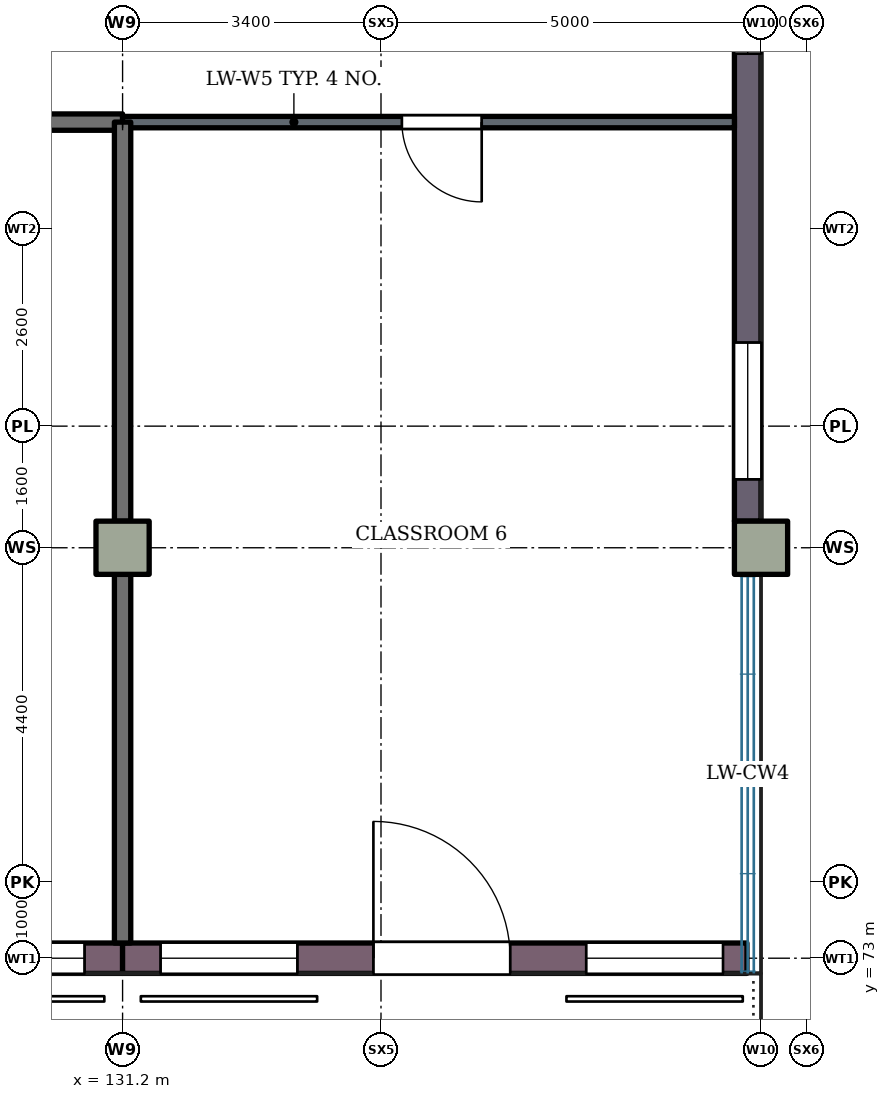
"""IFC4 building model, lengths in metres.
Left out: names, types, materials, properties, quantities, classifications, styles, units other than length and angle.
Written with IfcOpenShell. Run it as: python <this file> out.ifc"""

import sys

from ifc_helpers import new_model, si_unit, direction, frame, frame_2d, origin, origin_2d, place, context, subcontext, project, spatial, rectangle, extrude, element, fill, save


model = new_model("IFC4")
c1 = context("Model", 3, precision=1e-05, world=origin(), true_north=direction((0.0, 1.0)))
c2 = subcontext(c1, "Body", "Model", "MODEL_VIEW")
j1 = project(units=[si_unit("LENGTHUNIT", "METRE"), si_unit("PLANEANGLEUNIT", "RADIAN")], contexts=[c1])
p1 = place(None, origin())
s1 = spatial("IfcSite", under=j1, at=p1, CompositionType="ELEMENT")
p2 = place(p1, origin())
s2 = spatial("IfcBuilding", under=s1, at=p2, CompositionType="ELEMENT")
p3 = place(p2, frame((0.0, 0.0, 4.2)))
s3 = spatial("IfcBuildingStorey", under=s2, at=p3, CompositionType="ELEMENT", Elevation=4.2)
for number, where, z_axis, x_axis in (
    (1, (131.2, 78.4, 0.0), (0.0, 0.0, 1.0), (1.0, 0.0, 0.0)),
    (2, (139.6, 78.4, 0.0), (0.0, 0.0, 1.0), (1.0, 0.0, 0.0)),
):
    element("IfcColumn", number, at=place(p3, frame(where, z_axis=z_axis, x_axis=x_axis)), inside=s3, PredefinedType="COLUMN", context=c2, shape_type="SweptSolid", body=[
        extrude(rectangle(XDim=0.7, YDim=0.7, at=origin_2d()), origin(), (0.0, 0.0, 1.0), 4.2),
    ])
p4 = place(p3, frame((139.425, 87.25, 0.0), z_axis=(0.0, 0.0, 1.0), x_axis=(0.0, -1.0, 0.0)))
e3 = element("IfcWall", 3, at=p4, inside=s3, PredefinedType="SHEAR", context=c2, shape_type="SweptSolid", body=[
    extrude(rectangle(XDim=8.5, YDim=0.35, at=frame_2d((4.25, 0.0))), origin(), (0.0, 0.0, 1.0), 4.2),
])
p5 = place(p4, frame((6.15, 0.0, 0.9)))
e4 = element("IfcOpeningElement", 4, at=p5, cuts=e3, PredefinedType="OPENING", context=c2, shape_type="SweptSolid", body=[
    extrude(rectangle(XDim=1.8, YDim=2.1, at=frame_2d((0.9, 1.05))), frame((0.0, 0.185, 0.0), z_axis=(0.0, -1.0, 0.0), x_axis=(1.0, 0.0, 0.0)), (0.0, 0.0, 1.0), 0.37),
])
p6 = place(p4, frame((0.55, 0.0, 0.9)))
e5 = element("IfcOpeningElement", 5, at=p6, cuts=e3, PredefinedType="OPENING", context=c2, shape_type="SweptSolid", body=[
    extrude(rectangle(XDim=1.8, YDim=2.1, at=frame_2d((0.9, 1.05))), frame((0.0, 0.185, 0.0), z_axis=(0.0, -1.0, 0.0), x_axis=(1.0, 0.0, 0.0)), (0.0, 0.0, 1.0), 0.37),
])
p7 = place(p3, frame((122.8, 73.0, 0.0), z_axis=(0.0, 0.0, 1.0), x_axis=(1.0, 0.0, 0.0)))
e6 = element("IfcWall", 6, at=p7, inside=s3, PredefinedType="SOLIDWALL", context=c2, shape_type="SweptSolid", body=[
    extrude(rectangle(XDim=8.4, YDim=0.4, at=frame_2d((4.2, 0.0))), origin(), (0.0, 0.0, 1.0), 3.32),
])
p8 = place(p7, frame((3.3, 0.0, 0.0)))
e7 = element("IfcOpeningElement", 7, at=p8, cuts=e6, PredefinedType="OPENING", context=c2, shape_type="SweptSolid", body=[
    extrude(rectangle(XDim=1.8, YDim=2.4, at=frame_2d((0.9, 1.2))), frame((0.0, 0.21, 0.0), z_axis=(0.0, -1.0, 0.0), x_axis=(1.0, 0.0, 0.0)), (0.0, 0.0, 1.0), 0.42),
])
p9 = place(p7, frame((0.5, 0.0, 0.9)))
e8 = element("IfcOpeningElement", 8, at=p9, cuts=e6, PredefinedType="OPENING", context=c2, shape_type="SweptSolid", body=[
    extrude(rectangle(XDim=1.8, YDim=1.9, at=frame_2d((0.9, 0.95))), frame((0.0, 0.21, 0.0), z_axis=(0.0, -1.0, 0.0), x_axis=(1.0, 0.0, 0.0)), (0.0, 0.0, 1.0), 0.42),
])
p10 = place(p7, frame((6.1, 0.0, 0.9)))
e9 = element("IfcOpeningElement", 9, at=p10, cuts=e6, PredefinedType="OPENING", context=c2, shape_type="SweptSolid", body=[
    extrude(rectangle(XDim=1.8, YDim=1.9, at=frame_2d((0.9, 0.95))), frame((0.0, 0.21, 0.0), z_axis=(0.0, -1.0, 0.0), x_axis=(1.0, 0.0, 0.0)), (0.0, 0.0, 1.0), 0.42),
])
p11 = place(p3, frame((131.2, 73.0, 0.0), z_axis=(0.0, 0.0, 1.0), x_axis=(1.0, 0.0, 0.0)))
e10 = element("IfcWall", 10, at=p11, inside=s3, PredefinedType="SOLIDWALL", context=c2, shape_type="SweptSolid", body=[
    extrude(rectangle(XDim=8.215, YDim=0.4, at=frame_2d((4.107, 0.0))), origin(), (0.0, 0.0, 1.0), 3.32),
])
p12 = place(p11, frame((3.3, 0.0, 0.0)))
e11 = element("IfcOpeningElement", 11, at=p12, cuts=e10, PredefinedType="OPENING", context=c2, shape_type="SweptSolid", body=[
    extrude(rectangle(XDim=1.8, YDim=2.4, at=frame_2d((0.9, 1.2))), frame((0.0, 0.21, 0.0), z_axis=(0.0, -1.0, 0.0), x_axis=(1.0, 0.0, 0.0)), (0.0, 0.0, 1.0), 0.42),
])
p13 = place(p11, frame((0.5, 0.0, 0.9)))
e12 = element("IfcOpeningElement", 12, at=p13, cuts=e10, PredefinedType="OPENING", context=c2, shape_type="SweptSolid", body=[
    extrude(rectangle(XDim=1.8, YDim=1.9, at=frame_2d((0.9, 0.95))), frame((0.0, 0.21, 0.0), z_axis=(0.0, -1.0, 0.0), x_axis=(1.0, 0.0, 0.0)), (0.0, 0.0, 1.0), 0.42),
])
p14 = place(p11, frame((6.1, 0.0, 0.9)))
e13 = element("IfcOpeningElement", 13, at=p14, cuts=e10, PredefinedType="OPENING", context=c2, shape_type="SweptSolid", body=[
    extrude(rectangle(XDim=1.8, YDim=1.9, at=frame_2d((0.9, 0.95))), frame((0.0, 0.21, 0.0), z_axis=(0.0, -1.0, 0.0), x_axis=(1.0, 0.0, 0.0)), (0.0, 0.0, 1.0), 0.42),
])
p15 = place(p3, frame((89.2, 84.0, 0.0), z_axis=(0.0, 0.0, 1.0), x_axis=(1.0, 0.0, 0.0)))
e14 = element("IfcWall", 14, at=p15, inside=s3, PredefinedType="PARTITIONING", context=c2, shape_type="SweptSolid", body=[
    extrude(rectangle(XDim=42.0, YDim=0.215, at=frame_2d((21.0, 0.0))), origin(), (0.0, 0.0, 1.0), 3.92),
])
p16 = place(p15, frame((7.7, 0.0, 0.0)))
e15 = element("IfcOpeningElement", 15, at=p16, cuts=e14, PredefinedType="OPENING", context=c2, shape_type="SweptSolid", body=[
    extrude(rectangle(XDim=1.4, YDim=2.1, at=frame_2d((0.7, 1.05))), frame((0.0, 0.117, 0.0), z_axis=(0.0, -1.0, 0.0), x_axis=(1.0, 0.0, 0.0)), (0.0, 0.0, 1.0), 0.235),
])
p17 = place(p15, frame((20.475, 0.0, 0.0)))
e16 = element("IfcOpeningElement", 16, at=p17, cuts=e14, PredefinedType="OPENING", context=c2, shape_type="SweptSolid", body=[
    extrude(rectangle(XDim=1.05, YDim=2.1, at=frame_2d((0.525, 1.05))), frame((0.0, 0.117, 0.0), z_axis=(0.0, -1.0, 0.0), x_axis=(1.0, 0.0, 0.0)), (0.0, 0.0, 1.0), 0.235),
])
p18 = place(p15, frame((33.075, 0.0, 0.0)))
e17 = element("IfcOpeningElement", 17, at=p18, cuts=e14, PredefinedType="OPENING", context=c2, shape_type="SweptSolid", body=[
    extrude(rectangle(XDim=1.05, YDim=2.1, at=frame_2d((0.525, 1.05))), frame((0.0, 0.117, 0.0), z_axis=(0.0, -1.0, 0.0), x_axis=(1.0, 0.0, 0.0)), (0.0, 0.0, 1.0), 0.235),
])
p19 = place(p3, frame((131.2, 84.0, 0.0), z_axis=(0.0, 0.0, 1.0), x_axis=(1.0, 0.0, 0.0)))
e18 = element("IfcWall", 18, at=p19, inside=s3, PredefinedType="PARTITIONING", context=c2, shape_type="SweptSolid", body=[
    extrude(rectangle(XDim=8.05, YDim=0.15, at=frame_2d((4.025, 0.0))), origin(), (0.0, 0.0, 1.0), 3.92),
])
p20 = place(p19, frame((3.675, 0.0, 0.0)))
e19 = element("IfcOpeningElement", 19, at=p20, cuts=e18, PredefinedType="OPENING", context=c2, shape_type="SweptSolid", body=[
    extrude(rectangle(XDim=1.05, YDim=2.1, at=frame_2d((0.525, 1.05))), frame((0.0, 0.085, 0.0), z_axis=(0.0, -1.0, 0.0), x_axis=(1.0, 0.0, 0.0)), (0.0, 0.0, 1.0), 0.17),
])
p21 = place(p3, frame((131.2, 73.2, 0.0), z_axis=(0.0, 0.0, 1.0), x_axis=(0.0, 1.0, 0.0)))
e20 = element("IfcWall", 20, at=p21, inside=s3, PredefinedType="PARTITIONING", context=c2, shape_type="SweptSolid", body=[
    extrude(rectangle(XDim=4.85, YDim=0.215, at=frame_2d((2.425, 0.0))), origin(), (0.0, 0.0, 1.0), 3.02),
])
p22 = place(p3, frame((131.2, 78.75, 0.0), z_axis=(0.0, 0.0, 1.0), x_axis=(0.0, 1.0, 0.0)))
e21 = element("IfcWall", 21, at=p22, inside=s3, PredefinedType="PARTITIONING", context=c2, shape_type="SweptSolid", body=[
    extrude(rectangle(XDim=5.25, YDim=0.215, at=frame_2d((2.625, 0.0))), origin(), (0.0, 0.0, 1.0), 3.02),
])
p23 = place(p10, origin())
e22 = element("IfcWindow", 22, at=p23, inside=s3, PartitioningType="SINGLE_PANEL", PredefinedType="WINDOW", context=c2, shape_type="SweptSolid", body=[
    extrude(rectangle(XDim=1.8, YDim=1.9, at=frame_2d((0.9, 0.95))), frame((0.0, 0.03, 0.0), z_axis=(0.0, -1.0, 0.0), x_axis=(1.0, 0.0, 0.0)), (0.0, 0.0, 1.0), 0.06),
])
fill(e9, e22)
p24 = place(p12, origin())
e23 = element("IfcDoor", 23, at=p24, inside=s3, OperationType="DOUBLE_DOOR_SINGLE_SWING", PredefinedType="DOOR", context=c2, shape_type="SweptSolid", body=[
    extrude(rectangle(XDim=1.8, YDim=2.4, at=frame_2d((0.9, 1.2))), frame((0.0, 0.025, 0.0), z_axis=(0.0, -1.0, 0.0), x_axis=(1.0, 0.0, 0.0)), (0.0, 0.0, 1.0), 0.05),
])
fill(e11, e23)
p25 = place(p13, origin())
e24 = element("IfcWindow", 24, at=p25, inside=s3, PartitioningType="SINGLE_PANEL", PredefinedType="WINDOW", context=c2, shape_type="SweptSolid", body=[
    extrude(rectangle(XDim=1.8, YDim=1.9, at=frame_2d((0.9, 0.95))), frame((0.0, 0.03, 0.0), z_axis=(0.0, -1.0, 0.0), x_axis=(1.0, 0.0, 0.0)), (0.0, 0.0, 1.0), 0.06),
])
fill(e12, e24)
p26 = place(p14, origin())
e25 = element("IfcWindow", 25, at=p26, inside=s3, PartitioningType="SINGLE_PANEL", PredefinedType="WINDOW", context=c2, shape_type="SweptSolid", body=[
    extrude(rectangle(XDim=1.8, YDim=1.9, at=frame_2d((0.9, 0.95))), frame((0.0, 0.03, 0.0), z_axis=(0.0, -1.0, 0.0), x_axis=(1.0, 0.0, 0.0)), (0.0, 0.0, 1.0), 0.06),
])
fill(e13, e25)
p27 = place(p5, origin())
e26 = element("IfcWindow", 26, at=p27, inside=s3, PartitioningType="SINGLE_PANEL", PredefinedType="WINDOW", context=c2, shape_type="SweptSolid", body=[
    extrude(rectangle(XDim=1.8, YDim=2.1, at=frame_2d((0.9, 1.05))), frame((0.0, 0.03, 0.0), z_axis=(0.0, -1.0, 0.0), x_axis=(1.0, 0.0, 0.0)), (0.0, 0.0, 1.0), 0.06),
])
fill(e4, e26)
p28 = place(p6, origin())
e27 = element("IfcWindow", 27, at=p28, inside=s3, PartitioningType="SINGLE_PANEL", PredefinedType="WINDOW", context=c2, shape_type="SweptSolid", body=[
    extrude(rectangle(XDim=1.8, YDim=2.1, at=frame_2d((0.9, 1.05))), frame((0.0, 0.03, 0.0), z_axis=(0.0, -1.0, 0.0), x_axis=(1.0, 0.0, 0.0)), (0.0, 0.0, 1.0), 0.06),
])
fill(e5, e27)
p29 = place(p20, origin())
e28 = element("IfcDoor", 28, at=p29, inside=s3, OperationType="SINGLE_SWING_RIGHT", PredefinedType="DOOR", context=c2, shape_type="SweptSolid", body=[
    extrude(rectangle(XDim=1.05, YDim=2.1, at=frame_2d((0.525, 1.05))), frame((0.0, 0.025, 0.0), z_axis=(0.0, -1.0, 0.0), x_axis=(1.0, 0.0, 0.0)), (0.0, 0.0, 1.0), 0.05),
])
fill(e19, e28)
save(model, sys.argv[1])
